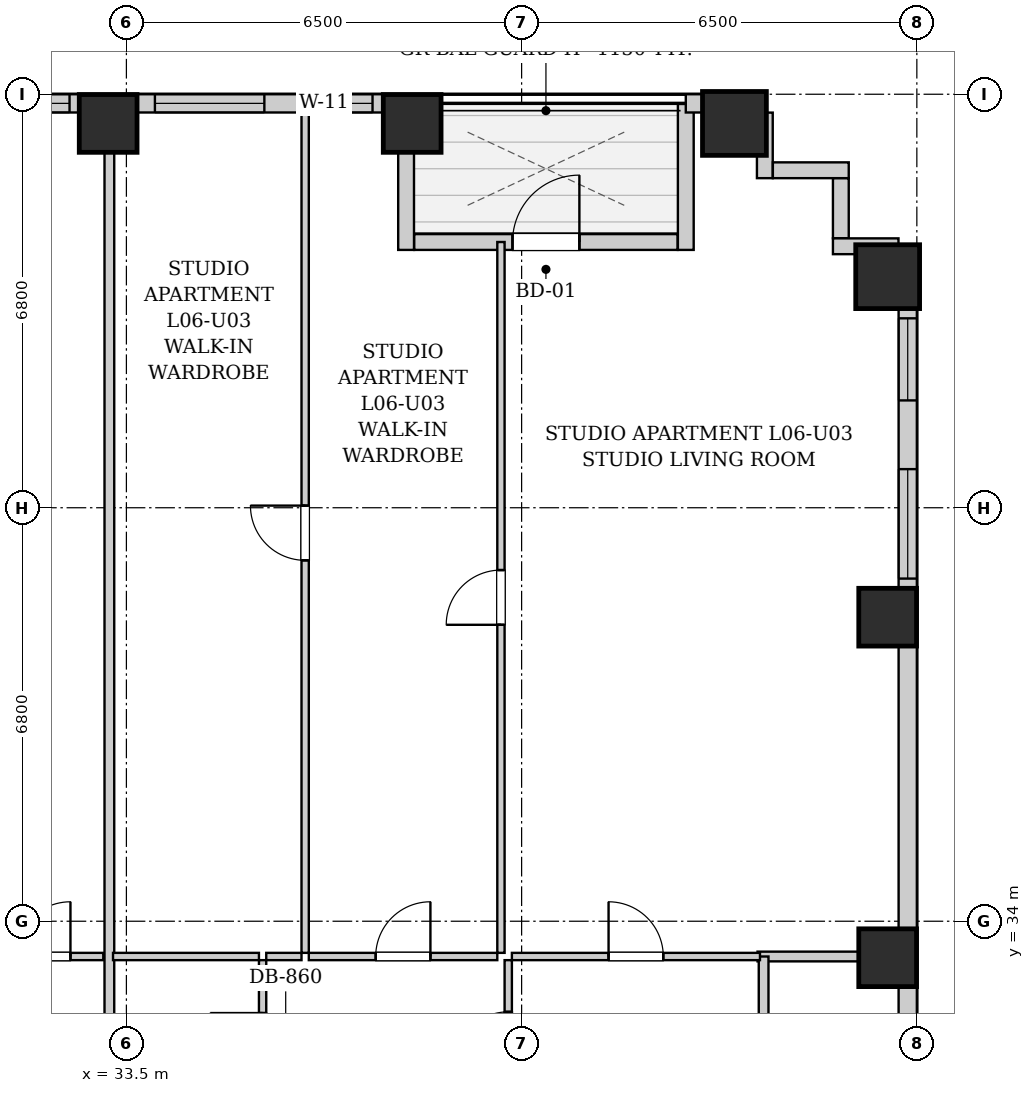
"""IFC4 building model, lengths in metres.
Left out: names, types, materials, properties, quantities, classifications, styles, units other than length and angle.
Written with IfcOpenShell. Run it as: python <this file> out.ifc"""

import sys

from ifc_helpers import new_model, si_unit, direction, frame, frame_2d, origin, origin_2d, place, context, subcontext, project, spatial, rectangle, extrude, element, fill, save


model = new_model("IFC4")
c1 = context("Model", 3, precision=1e-05, world=origin(), true_north=direction((0.0, 1.0)))
c2 = subcontext(c1, "Body", "Model", "MODEL_VIEW")
j1 = project(units=[si_unit("LENGTHUNIT", "METRE"), si_unit("PLANEANGLEUNIT", "RADIAN")], contexts=[c1])
p1 = place(None, origin())
s1 = spatial("IfcSite", under=j1, at=p1, CompositionType="ELEMENT")
p2 = place(p1, origin())
s2 = spatial("IfcBuilding", under=s1, at=p2, CompositionType="ELEMENT")
p3 = place(p2, frame((0.0, 0.0, 29.0)))
s3 = spatial("IfcBuildingStorey", under=s2, at=p3, CompositionType="ELEMENT", Elevation=29.0)
for number, where, z_axis, x_axis in (
    (1, (33.2, 47.12, 0.0), (0.0, 0.0, 1.0), (1.0, 0.0, 0.0)),
    (2, (38.2, 47.12, 0.0), (0.0, 0.0, 1.0), (1.0, 0.0, 0.0)),
):
    element("IfcColumn", number, at=place(p3, frame(where, z_axis=z_axis, x_axis=x_axis)), inside=s3, PredefinedType="COLUMN", context=c2, shape_type="SweptSolid", body=[
        extrude(rectangle(XDim=0.95, YDim=0.95, at=origin_2d()), origin(), (0.0, 0.0, 1.0), 3.2),
    ])
p4 = place(p3, frame((43.5, 47.12, 0.0), z_axis=(0.0, 0.0, 1.0), x_axis=(1.0, 0.0, 0.0)))
e3 = element("IfcColumn", 3, at=p4, inside=s3, PredefinedType="COLUMN", context=c2, shape_type="SweptSolid", body=[
    extrude(rectangle(XDim=1.05, YDim=1.05, at=origin_2d()), origin(), (0.0, 0.0, 1.0), 3.2),
])
for number, where, z_axis, x_axis in (
    (4, (46.02, 33.4, 0.0), (0.0, 0.0, 1.0), (1.0, 0.0, 0.0)),
    (5, (46.02, 39.0, 0.0), (0.0, 0.0, 1.0), (1.0, 0.0, 0.0)),
):
    element("IfcColumn", number, at=place(p3, frame(where, z_axis=z_axis, x_axis=x_axis)), inside=s3, PredefinedType="COLUMN", context=c2, shape_type="SweptSolid", body=[
        extrude(rectangle(XDim=0.95, YDim=0.95, at=origin_2d()), origin(), (0.0, 0.0, 1.0), 3.2),
    ])
p5 = place(p3, frame((46.02, 44.6, 0.0), z_axis=(0.0, 0.0, 1.0), x_axis=(1.0, 0.0, 0.0)))
e6 = element("IfcColumn", 6, at=p5, inside=s3, PredefinedType="COLUMN", context=c2, shape_type="SweptSolid", body=[
    extrude(rectangle(XDim=1.05, YDim=1.05, at=origin_2d()), origin(), (0.0, 0.0, 1.0), 3.2),
])
p6 = place(p3, frame((10.0, 47.45, 0.0), z_axis=(0.0, 0.0, 1.0), x_axis=(1.0, 0.0, 0.0)))
e7 = element("IfcWall", 7, at=p6, inside=s3, PredefinedType="SOLIDWALL", context=c2, shape_type="SweptSolid", body=[
    extrude(rectangle(XDim=28.1, YDim=0.3, at=frame_2d((14.05, 0.0))), origin(), (0.0, 0.0, 1.0), 1.975),
])
p7 = place(p6, frame((5.712, 0.0, 0.55)))
e8 = element("IfcOpeningElement", 8, at=p7, cuts=e7, PredefinedType="OPENING", context=c2, shape_type="SweptSolid", body=[
    extrude(rectangle(XDim=1.35, YDim=1.2, at=frame_2d((0.675, 0.6))), frame((0.0, 0.16, 0.0), z_axis=(0.0, -1.0, 0.0), x_axis=(1.0, 0.0, 0.0)), (0.0, 0.0, 1.0), 0.32),
])
p8 = place(p6, frame((8.792, 0.0, 0.55)))
e9 = element("IfcOpeningElement", 9, at=p8, cuts=e7, PredefinedType="OPENING", context=c2, shape_type="SweptSolid", body=[
    extrude(rectangle(XDim=1.8, YDim=1.2, at=frame_2d((0.9, 0.6))), frame((0.0, 0.16, 0.0), z_axis=(0.0, -1.0, 0.0), x_axis=(1.0, 0.0, 0.0)), (0.0, 0.0, 1.0), 0.32),
])
p9 = place(p6, frame((18.86, 0.0, 0.55)))
e10 = element("IfcOpeningElement", 10, at=p9, cuts=e7, PredefinedType="OPENING", context=c2, shape_type="SweptSolid", body=[
    extrude(rectangle(XDim=1.8, YDim=1.2, at=frame_2d((0.9, 0.6))), frame((0.0, 0.16, 0.0), z_axis=(0.0, -1.0, 0.0), x_axis=(1.0, 0.0, 0.0)), (0.0, 0.0, 1.0), 0.32),
])
p10 = place(p6, frame((21.215, 0.0, 0.55)))
e11 = element("IfcOpeningElement", 11, at=p10, cuts=e7, PredefinedType="OPENING", context=c2, shape_type="SweptSolid", body=[
    extrude(rectangle(XDim=1.35, YDim=1.2, at=frame_2d((0.675, 0.6))), frame((0.0, 0.16, 0.0), z_axis=(0.0, -1.0, 0.0), x_axis=(1.0, 0.0, 0.0)), (0.0, 0.0, 1.0), 0.32),
])
p11 = place(p6, frame((23.969, 0.0, 0.55)))
e12 = element("IfcOpeningElement", 12, at=p11, cuts=e7, PredefinedType="OPENING", context=c2, shape_type="SweptSolid", body=[
    extrude(rectangle(XDim=1.8, YDim=1.2, at=frame_2d((0.9, 0.6))), frame((0.0, 0.16, 0.0), z_axis=(0.0, -1.0, 0.0), x_axis=(1.0, 0.0, 0.0)), (0.0, 0.0, 1.0), 0.32),
])
p12 = place(p6, frame((26.698, 0.0, 0.55)))
e13 = element("IfcOpeningElement", 13, at=p12, cuts=e7, PredefinedType="OPENING", context=c2, shape_type="SweptSolid", body=[
    extrude(rectangle(XDim=0.85, YDim=1.2, at=frame_2d((0.425, 0.6))), frame((0.0, 0.16, 0.0), z_axis=(0.0, -1.0, 0.0), x_axis=(1.0, 0.0, 0.0)), (0.0, 0.0, 1.0), 0.32),
])
p13 = place(p3, frame((38.1, 47.44, 0.0), z_axis=(0.0, 0.0, 1.0), x_axis=(0.0, -1.0, 0.0)))
e14 = element("IfcWall", 14, at=p13, inside=s3, PredefinedType="SOLIDWALL", context=c2, shape_type="SweptSolid", body=[
    extrude(rectangle(XDim=2.4, YDim=0.26, at=frame_2d((1.2, 0.0))), origin(), (0.0, 0.0, 1.0), 2.94),
])
p14 = place(p3, frame((38.234, 45.17, 0.0), z_axis=(0.0, 0.0, 1.0), x_axis=(1.0, 0.0, 0.0)))
e15 = element("IfcWall", 15, at=p14, inside=s3, PredefinedType="SOLIDWALL", context=c2, shape_type="SweptSolid", body=[
    extrude(rectangle(XDim=4.332, YDim=0.26, at=frame_2d((2.166, 0.0))), origin(), (0.0, 0.0, 1.0), 2.94),
])
p15 = place(p14, frame((1.616, 0.0, 0.0)))
e16 = element("IfcOpeningElement", 16, at=p15, cuts=e15, PredefinedType="OPENING", context=c2, shape_type="SweptSolid", body=[
    extrude(rectangle(XDim=1.1, YDim=2.0, at=frame_2d((0.55, 1.0))), frame((0.0, 0.14, 0.0), z_axis=(0.0, -1.0, 0.0), x_axis=(1.0, 0.0, 0.0)), (0.0, 0.0, 1.0), 0.28),
])
p16 = place(p3, frame((42.7, 45.04, 0.0), z_axis=(0.0, 0.0, 1.0), x_axis=(0.0, 1.0, 0.0)))
e17 = element("IfcWall", 17, at=p16, inside=s3, PredefinedType="SOLIDWALL", context=c2, shape_type="SweptSolid", body=[
    extrude(rectangle(XDim=2.4, YDim=0.26, at=frame_2d((1.2, 0.0))), origin(), (0.0, 0.0, 1.0), 2.94),
])
p17 = place(p3, frame((42.7, 47.45, 0.0), z_axis=(0.0, 0.0, 1.0), x_axis=(1.0, 0.0, 0.0)))
e18 = element("IfcWall", 18, at=p17, inside=s3, PredefinedType="SOLIDWALL", context=c2, shape_type="SweptSolid", body=[
    extrude(rectangle(XDim=1.3, YDim=0.3, at=frame_2d((0.65, 0.0))), origin(), (0.0, 0.0, 1.0), 1.975),
])
p18 = place(p3, frame((46.35, 45.1, 0.0), z_axis=(0.0, 0.0, 1.0), x_axis=(0.0, -1.0, 0.0)))
e19 = element("IfcWall", 19, at=p18, inside=s3, PredefinedType="SOLIDWALL", context=c2, shape_type="SweptSolid", body=[
    extrude(rectangle(XDim=42.6, YDim=0.3, at=frame_2d((21.3, 0.0))), origin(), (0.0, 0.0, 1.0), 1.975),
])
p19 = place(p18, frame((37.575, 0.0, 0.55)))
e20 = element("IfcOpeningElement", 20, at=p19, cuts=e19, PredefinedType="OPENING", context=c2, shape_type="SweptSolid", body=[
    extrude(rectangle(XDim=1.8, YDim=1.2, at=frame_2d((0.9, 0.6))), frame((0.0, 0.16, 0.0), z_axis=(0.0, -1.0, 0.0), x_axis=(1.0, 0.0, 0.0)), (0.0, 0.0, 1.0), 0.32),
])
p20 = place(p18, frame((34.85, 0.0, 0.55)))
e21 = element("IfcOpeningElement", 21, at=p20, cuts=e19, PredefinedType="OPENING", context=c2, shape_type="SweptSolid", body=[
    extrude(rectangle(XDim=1.35, YDim=1.2, at=frame_2d((0.675, 0.6))), frame((0.0, 0.16, 0.0), z_axis=(0.0, -1.0, 0.0), x_axis=(1.0, 0.0, 0.0)), (0.0, 0.0, 1.0), 0.32),
])
p21 = place(p18, frame((3.665, 0.0, 0.55)))
e22 = element("IfcOpeningElement", 22, at=p21, cuts=e19, PredefinedType="OPENING", context=c2, shape_type="SweptSolid", body=[
    extrude(rectangle(XDim=1.8, YDim=1.2, at=frame_2d((0.9, 0.6))), frame((0.0, 0.16, 0.0), z_axis=(0.0, -1.0, 0.0), x_axis=(1.0, 0.0, 0.0)), (0.0, 0.0, 1.0), 0.32),
])
p22 = place(p18, frame((1.185, 0.0, 0.55)))
e23 = element("IfcOpeningElement", 23, at=p22, cuts=e19, PredefinedType="OPENING", context=c2, shape_type="SweptSolid", body=[
    extrude(rectangle(XDim=1.35, YDim=1.2, at=frame_2d((0.675, 0.6))), frame((0.0, 0.16, 0.0), z_axis=(0.0, -1.0, 0.0), x_axis=(1.0, 0.0, 0.0)), (0.0, 0.0, 1.0), 0.32),
])
p23 = place(p18, frame((27.225, 0.0, 0.55)))
e24 = element("IfcOpeningElement", 24, at=p23, cuts=e19, PredefinedType="OPENING", context=c2, shape_type="SweptSolid", body=[
    extrude(rectangle(XDim=1.8, YDim=1.2, at=frame_2d((0.9, 0.6))), frame((0.0, 0.16, 0.0), z_axis=(0.0, -1.0, 0.0), x_axis=(1.0, 0.0, 0.0)), (0.0, 0.0, 1.0), 0.32),
])
p24 = place(p18, frame((17.1, 0.0, 0.55)))
e25 = element("IfcOpeningElement", 25, at=p24, cuts=e19, PredefinedType="OPENING", context=c2, shape_type="SweptSolid", body=[
    extrude(rectangle(XDim=1.8, YDim=1.2, at=frame_2d((0.9, 0.6))), frame((0.0, 0.16, 0.0), z_axis=(0.0, -1.0, 0.0), x_axis=(1.0, 0.0, 0.0)), (0.0, 0.0, 1.0), 0.32),
])
p25 = place(p3, frame((44.0, 47.298, 0.0), z_axis=(0.0, 0.0, 1.0), x_axis=(0.0, -1.0, 0.0)))
e26 = element("IfcWall", 26, at=p25, inside=s3, PredefinedType="SOLIDWALL", context=c2, shape_type="SweptSolid", body=[
    extrude(rectangle(XDim=1.078, YDim=0.26, at=frame_2d((0.539, 0.0))), origin(), (0.0, 0.0, 1.0), 2.94),
])
p26 = place(p3, frame((44.132, 46.35, 0.0), z_axis=(0.0, 0.0, 1.0), x_axis=(1.0, 0.0, 0.0)))
e27 = element("IfcWall", 27, at=p26, inside=s3, PredefinedType="SOLIDWALL", context=c2, shape_type="SweptSolid", body=[
    extrude(rectangle(XDim=1.248, YDim=0.26, at=frame_2d((0.624, 0.0))), origin(), (0.0, 0.0, 1.0), 2.94),
])
p27 = place(p3, frame((45.25, 46.218, 0.0), z_axis=(0.0, 0.0, 1.0), x_axis=(0.0, -1.0, 0.0)))
e28 = element("IfcWall", 28, at=p27, inside=s3, PredefinedType="SOLIDWALL", context=c2, shape_type="SweptSolid", body=[
    extrude(rectangle(XDim=0.986, YDim=0.26, at=frame_2d((0.493, 0.0))), origin(), (0.0, 0.0, 1.0), 2.94),
])
p28 = place(p3, frame((45.12, 45.1, 0.0), z_axis=(0.0, 0.0, 1.0), x_axis=(1.0, 0.0, 0.0)))
e29 = element("IfcWall", 29, at=p28, inside=s3, PredefinedType="SOLIDWALL", context=c2, shape_type="SweptSolid", body=[
    extrude(rectangle(XDim=1.078, YDim=0.26, at=frame_2d((0.539, 0.0))), origin(), (0.0, 0.0, 1.0), 2.94),
])
p29 = place(p3, frame((31.14, 33.42, 0.0), z_axis=(0.0, 0.0, 1.0), x_axis=(1.0, 0.0, 0.0)))
e30 = element("IfcWall", 30, at=p29, inside=s3, PredefinedType="PARTITIONING", context=c2, shape_type="SweptSolid", body=[
    extrude(rectangle(XDim=1.98, YDim=0.12, at=frame_2d((0.99, 0.0))), origin(), (0.0, 0.0, 1.0), 2.94),
])
p30 = place(p29, frame((0.54, 0.0, 0.0)))
e31 = element("IfcOpeningElement", 31, at=p30, cuts=e30, PredefinedType="OPENING", context=c2, shape_type="SweptSolid", body=[
    extrude(rectangle(XDim=0.9, YDim=2.05, at=frame_2d((0.45, 1.025))), frame((0.0, 0.07, 0.0), z_axis=(0.0, -1.0, 0.0), x_axis=(1.0, 0.0, 0.0)), (0.0, 0.0, 1.0), 0.14),
])
p31 = place(p3, frame((43.88, 33.42, 0.0), z_axis=(0.0, 0.0, 1.0), x_axis=(1.0, 0.0, 0.0)))
e32 = element("IfcWall", 32, at=p31, inside=s3, PredefinedType="PARTITIONING", context=c2, shape_type="SweptSolid", body=[
    extrude(rectangle(XDim=2.34, YDim=0.16, at=frame_2d((1.17, 0.0))), origin(), (0.0, 0.0, 1.0), 2.94),
])
p32 = place(p3, frame((43.98, 30.76, 0.0), z_axis=(0.0, 0.0, 1.0), x_axis=(0.0, 1.0, 0.0)))
e33 = element("IfcWall", 33, at=p32, inside=s3, PredefinedType="PARTITIONING", context=c2, shape_type="SweptSolid", body=[
    extrude(rectangle(XDim=2.66, YDim=0.16, at=frame_2d((1.33, 0.0))), origin(), (0.0, 0.0, 1.0), 2.94),
])
p33 = place(p3, frame((33.22, 30.76, 0.0), z_axis=(0.0, 0.0, 1.0), x_axis=(0.0, 1.0, 0.0)))
e34 = element("IfcWall", 34, at=p33, inside=s3, PredefinedType="PARTITIONING", context=c2, shape_type="SweptSolid", body=[
    extrude(rectangle(XDim=16.56, YDim=0.16, at=frame_2d((8.28, 0.0))), origin(), (0.0, 0.0, 1.0), 2.155),
])
p34 = place(p3, frame((35.74, 30.76, 0.0), z_axis=(0.0, 0.0, 1.0), x_axis=(0.0, 1.0, 0.0)))
e35 = element("IfcWall", 35, at=p34, inside=s3, PredefinedType="PARTITIONING", context=c2, shape_type="SweptSolid", body=[
    extrude(rectangle(XDim=2.6, YDim=0.12, at=frame_2d((1.3, 0.0))), origin(), (0.0, 0.0, 1.0), 2.94),
])
p35 = place(p34, frame((0.87, 0.0, 0.0)))
e36 = element("IfcOpeningElement", 36, at=p35, cuts=e35, PredefinedType="OPENING", context=c2, shape_type="SweptSolid", body=[
    extrude(rectangle(XDim=0.86, YDim=2.05, at=frame_2d((0.43, 1.025))), frame((0.0, 0.07, 0.0), z_axis=(0.0, -1.0, 0.0), x_axis=(1.0, 0.0, 0.0)), (0.0, 0.0, 1.0), 0.14),
])
p36 = place(p3, frame((33.28, 33.42, 0.0), z_axis=(0.0, 0.0, 1.0), x_axis=(1.0, 0.0, 0.0)))
e37 = element("IfcWall", 37, at=p36, inside=s3, PredefinedType="PARTITIONING", context=c2, shape_type="SweptSolid", body=[
    extrude(rectangle(XDim=2.4, YDim=0.12, at=frame_2d((1.2, 0.0))), origin(), (0.0, 0.0, 1.0), 2.94),
])
p37 = place(p3, frame((39.78, 30.76, 0.0), z_axis=(0.0, 0.0, 1.0), x_axis=(0.0, 1.0, 0.0)))
e38 = element("IfcWall", 38, at=p37, inside=s3, PredefinedType="PARTITIONING", context=c2, shape_type="SweptSolid", body=[
    extrude(rectangle(XDim=2.6, YDim=0.12, at=frame_2d((1.3, 0.0))), origin(), (0.0, 0.0, 1.0), 2.94),
])
p38 = place(p37, frame((0.85, 0.0, 0.0)))
e39 = element("IfcOpeningElement", 39, at=p38, cuts=e38, PredefinedType="OPENING", context=c2, shape_type="SweptSolid", body=[
    extrude(rectangle(XDim=0.9, YDim=2.05, at=frame_2d((0.45, 1.025))), frame((0.0, 0.07, 0.0), z_axis=(0.0, -1.0, 0.0), x_axis=(1.0, 0.0, 0.0)), (0.0, 0.0, 1.0), 0.14),
])
p39 = place(p3, frame((35.8, 33.42, 0.0), z_axis=(0.0, 0.0, 1.0), x_axis=(1.0, 0.0, 0.0)))
e40 = element("IfcWall", 40, at=p39, inside=s3, PredefinedType="PARTITIONING", context=c2, shape_type="SweptSolid", body=[
    extrude(rectangle(XDim=0.58, YDim=0.12, at=frame_2d((0.29, 0.0))), origin(), (0.0, 0.0, 1.0), 2.94),
])
p40 = place(p3, frame((36.5, 33.42, 0.0), z_axis=(0.0, 0.0, 1.0), x_axis=(1.0, 0.0, 0.0)))
e41 = element("IfcWall", 41, at=p40, inside=s3, PredefinedType="PARTITIONING", context=c2, shape_type="SweptSolid", body=[
    extrude(rectangle(XDim=3.1, YDim=0.12, at=frame_2d((1.55, 0.0))), origin(), (0.0, 0.0, 1.0), 2.94),
])
p41 = place(p40, frame((1.1, 0.0, 0.0)))
e42 = element("IfcOpeningElement", 42, at=p41, cuts=e41, PredefinedType="OPENING", context=c2, shape_type="SweptSolid", body=[
    extrude(rectangle(XDim=0.9, YDim=2.05, at=frame_2d((0.45, 1.025))), frame((0.0, 0.07, 0.0), z_axis=(0.0, -1.0, 0.0), x_axis=(1.0, 0.0, 0.0)), (0.0, 0.0, 1.0), 0.14),
])
p42 = place(p3, frame((39.84, 33.42, 0.0), z_axis=(0.0, 0.0, 1.0), x_axis=(1.0, 0.0, 0.0)))
e43 = element("IfcWall", 43, at=p42, inside=s3, PredefinedType="PARTITIONING", context=c2, shape_type="SweptSolid", body=[
    extrude(rectangle(XDim=4.08, YDim=0.12, at=frame_2d((2.04, 0.0))), origin(), (0.0, 0.0, 1.0), 2.94),
])
p43 = place(p42, frame((1.59, 0.0, 0.0)))
e44 = element("IfcOpeningElement", 44, at=p43, cuts=e43, PredefinedType="OPENING", context=c2, shape_type="SweptSolid", body=[
    extrude(rectangle(XDim=0.9, YDim=2.05, at=frame_2d((0.45, 1.025))), frame((0.0, 0.07, 0.0), z_axis=(0.0, -1.0, 0.0), x_axis=(1.0, 0.0, 0.0)), (0.0, 0.0, 1.0), 0.14),
])
p44 = place(p3, frame((36.44, 33.48, 0.0), z_axis=(0.0, 0.0, 1.0), x_axis=(0.0, 1.0, 0.0)))
e45 = element("IfcWall", 45, at=p44, inside=s3, PredefinedType="PARTITIONING", context=c2, shape_type="SweptSolid", body=[
    extrude(rectangle(XDim=13.84, YDim=0.12, at=frame_2d((6.92, 0.0))), origin(), (0.0, 0.0, 1.0), 2.94),
])
p45 = place(p44, frame((6.455, 0.0, 0.0)))
e46 = element("IfcOpeningElement", 46, at=p45, cuts=e45, PredefinedType="OPENING", context=c2, shape_type="SweptSolid", body=[
    extrude(rectangle(XDim=0.9, YDim=2.05, at=frame_2d((0.45, 1.025))), frame((0.0, 0.07, 0.0), z_axis=(0.0, -1.0, 0.0), x_axis=(1.0, 0.0, 0.0)), (0.0, 0.0, 1.0), 0.14),
])
p46 = place(p3, frame((39.66, 33.48, 0.0), z_axis=(0.0, 0.0, 1.0), x_axis=(0.0, 1.0, 0.0)))
e47 = element("IfcWall", 47, at=p46, inside=s3, PredefinedType="PARTITIONING", context=c2, shape_type="SweptSolid", body=[
    extrude(rectangle(XDim=11.69, YDim=0.12, at=frame_2d((5.845, 0.0))), origin(), (0.0, 0.0, 1.0), 2.94),
])
p47 = place(p46, frame((5.395, 0.0, 0.0)))
e48 = element("IfcOpeningElement", 48, at=p47, cuts=e47, PredefinedType="OPENING", context=c2, shape_type="SweptSolid", body=[
    extrude(rectangle(XDim=0.9, YDim=2.05, at=frame_2d((0.45, 1.025))), frame((0.0, 0.07, 0.0), z_axis=(0.0, -1.0, 0.0), x_axis=(1.0, 0.0, 0.0)), (0.0, 0.0, 1.0), 0.14),
])
p48 = place(p30, origin())
e49 = element("IfcDoor", 49, at=p48, inside=s3, OperationType="SINGLE_SWING_RIGHT", PredefinedType="DOOR", context=c2, shape_type="SweptSolid", body=[
    extrude(rectangle(XDim=0.9, YDim=2.05, at=frame_2d((0.45, 1.025))), frame((0.0, 0.025, 0.0), z_axis=(0.0, -1.0, 0.0), x_axis=(1.0, 0.0, 0.0)), (0.0, 0.0, 1.0), 0.05),
])
fill(e31, e49)
p49 = place(p35, origin())
e50 = element("IfcDoor", 50, at=p49, inside=s3, OperationType="SINGLE_SWING_RIGHT", PredefinedType="DOOR", context=c2, shape_type="SweptSolid", body=[
    extrude(rectangle(XDim=0.86, YDim=2.05, at=frame_2d((0.43, 1.025))), frame((0.0, 0.025, 0.0), z_axis=(0.0, -1.0, 0.0), x_axis=(1.0, 0.0, 0.0)), (0.0, 0.0, 1.0), 0.05),
])
fill(e36, e50)
p50 = place(p38, origin())
e51 = element("IfcDoor", 51, at=p50, inside=s3, OperationType="SINGLE_SWING_LEFT", PredefinedType="DOOR", context=c2, shape_type="SweptSolid", body=[
    extrude(rectangle(XDim=0.9, YDim=2.05, at=frame_2d((0.45, 1.025))), frame((0.0, 0.025, 0.0), z_axis=(0.0, -1.0, 0.0), x_axis=(1.0, 0.0, 0.0)), (0.0, 0.0, 1.0), 0.05),
])
fill(e39, e51)
p51 = place(p41, origin())
e52 = element("IfcDoor", 52, at=p51, inside=s3, OperationType="SINGLE_SWING_RIGHT", PredefinedType="DOOR", context=c2, shape_type="SweptSolid", body=[
    extrude(rectangle(XDim=0.9, YDim=2.05, at=frame_2d((0.45, 1.025))), frame((0.0, 0.025, 0.0), z_axis=(0.0, -1.0, 0.0), x_axis=(1.0, 0.0, 0.0)), (0.0, 0.0, 1.0), 0.05),
])
fill(e42, e52)
p52 = place(p43, origin())
e53 = element("IfcDoor", 53, at=p52, inside=s3, OperationType="SINGLE_SWING_LEFT", PredefinedType="DOOR", context=c2, shape_type="SweptSolid", body=[
    extrude(rectangle(XDim=0.9, YDim=2.05, at=frame_2d((0.45, 1.025))), frame((0.0, 0.025, 0.0), z_axis=(0.0, -1.0, 0.0), x_axis=(1.0, 0.0, 0.0)), (0.0, 0.0, 1.0), 0.05),
])
fill(e44, e53)
p53 = place(p45, origin())
e54 = element("IfcDoor", 54, at=p53, inside=s3, OperationType="SINGLE_SWING_RIGHT", PredefinedType="DOOR", context=c2, shape_type="SweptSolid", body=[
    extrude(rectangle(XDim=0.9, YDim=2.05, at=frame_2d((0.45, 1.025))), frame((0.0, 0.025, 0.0), z_axis=(0.0, -1.0, 0.0), x_axis=(1.0, 0.0, 0.0)), (0.0, 0.0, 1.0), 0.05),
])
fill(e46, e54)
p54 = place(p47, origin())
e55 = element("IfcDoor", 55, at=p54, inside=s3, OperationType="SINGLE_SWING_LEFT", PredefinedType="DOOR", context=c2, shape_type="SweptSolid", body=[
    extrude(rectangle(XDim=0.9, YDim=2.05, at=frame_2d((0.45, 1.025))), frame((0.0, 0.025, 0.0), z_axis=(0.0, -1.0, 0.0), x_axis=(1.0, 0.0, 0.0)), (0.0, 0.0, 1.0), 0.05),
])
fill(e48, e55)
p55 = place(p15, origin())
e56 = element("IfcDoor", 56, at=p55, inside=s3, OperationType="SINGLE_SWING_RIGHT", PredefinedType="DOOR", context=c2, shape_type="SweptSolid", body=[
    extrude(rectangle(XDim=1.1, YDim=2.0, at=frame_2d((0.55, 1.0))), frame((0.0, 0.025, 0.0), z_axis=(0.0, -1.0, 0.0), x_axis=(1.0, 0.0, 0.0)), (0.0, 0.0, 1.0), 0.05),
])
fill(e16, e56)
p56 = place(p10, origin())
e57 = element("IfcWindow", 57, at=p56, inside=s3, PartitioningType="SINGLE_PANEL", PredefinedType="WINDOW", context=c2, shape_type="SweptSolid", body=[
    extrude(rectangle(XDim=1.35, YDim=1.2, at=frame_2d((0.675, 0.6))), frame((0.0, 0.03, 0.0), z_axis=(0.0, -1.0, 0.0), x_axis=(1.0, 0.0, 0.0)), (0.0, 0.0, 1.0), 0.06),
])
fill(e11, e57)
p57 = place(p11, origin())
e58 = element("IfcWindow", 58, at=p57, inside=s3, PartitioningType="DOUBLE_PANEL_VERTICAL", PredefinedType="WINDOW", context=c2, shape_type="SweptSolid", body=[
    extrude(rectangle(XDim=1.8, YDim=1.2, at=frame_2d((0.9, 0.6))), frame((0.0, 0.03, 0.0), z_axis=(0.0, -1.0, 0.0), x_axis=(1.0, 0.0, 0.0)), (0.0, 0.0, 1.0), 0.06),
])
fill(e12, e58)
p58 = place(p12, origin())
e59 = element("IfcWindow", 59, at=p58, inside=s3, PartitioningType="SINGLE_PANEL", PredefinedType="WINDOW", context=c2, shape_type="SweptSolid", body=[
    extrude(rectangle(XDim=0.85, YDim=1.2, at=frame_2d((0.425, 0.6))), frame((0.0, 0.03, 0.0), z_axis=(0.0, -1.0, 0.0), x_axis=(1.0, 0.0, 0.0)), (0.0, 0.0, 1.0), 0.06),
])
fill(e13, e59)
p59 = place(p21, origin())
e60 = element("IfcWindow", 60, at=p59, inside=s3, PartitioningType="DOUBLE_PANEL_VERTICAL", PredefinedType="WINDOW", context=c2, shape_type="SweptSolid", body=[
    extrude(rectangle(XDim=1.8, YDim=1.2, at=frame_2d((0.9, 0.6))), frame((0.0, 0.03, 0.0), z_axis=(0.0, -1.0, 0.0), x_axis=(1.0, 0.0, 0.0)), (0.0, 0.0, 1.0), 0.06),
])
fill(e22, e60)
p60 = place(p22, origin())
e61 = element("IfcWindow", 61, at=p60, inside=s3, PartitioningType="SINGLE_PANEL", PredefinedType="WINDOW", context=c2, shape_type="SweptSolid", body=[
    extrude(rectangle(XDim=1.35, YDim=1.2, at=frame_2d((0.675, 0.6))), frame((0.0, 0.03, 0.0), z_axis=(0.0, -1.0, 0.0), x_axis=(1.0, 0.0, 0.0)), (0.0, 0.0, 1.0), 0.06),
])
fill(e23, e61)
save(model, sys.argv[1])
